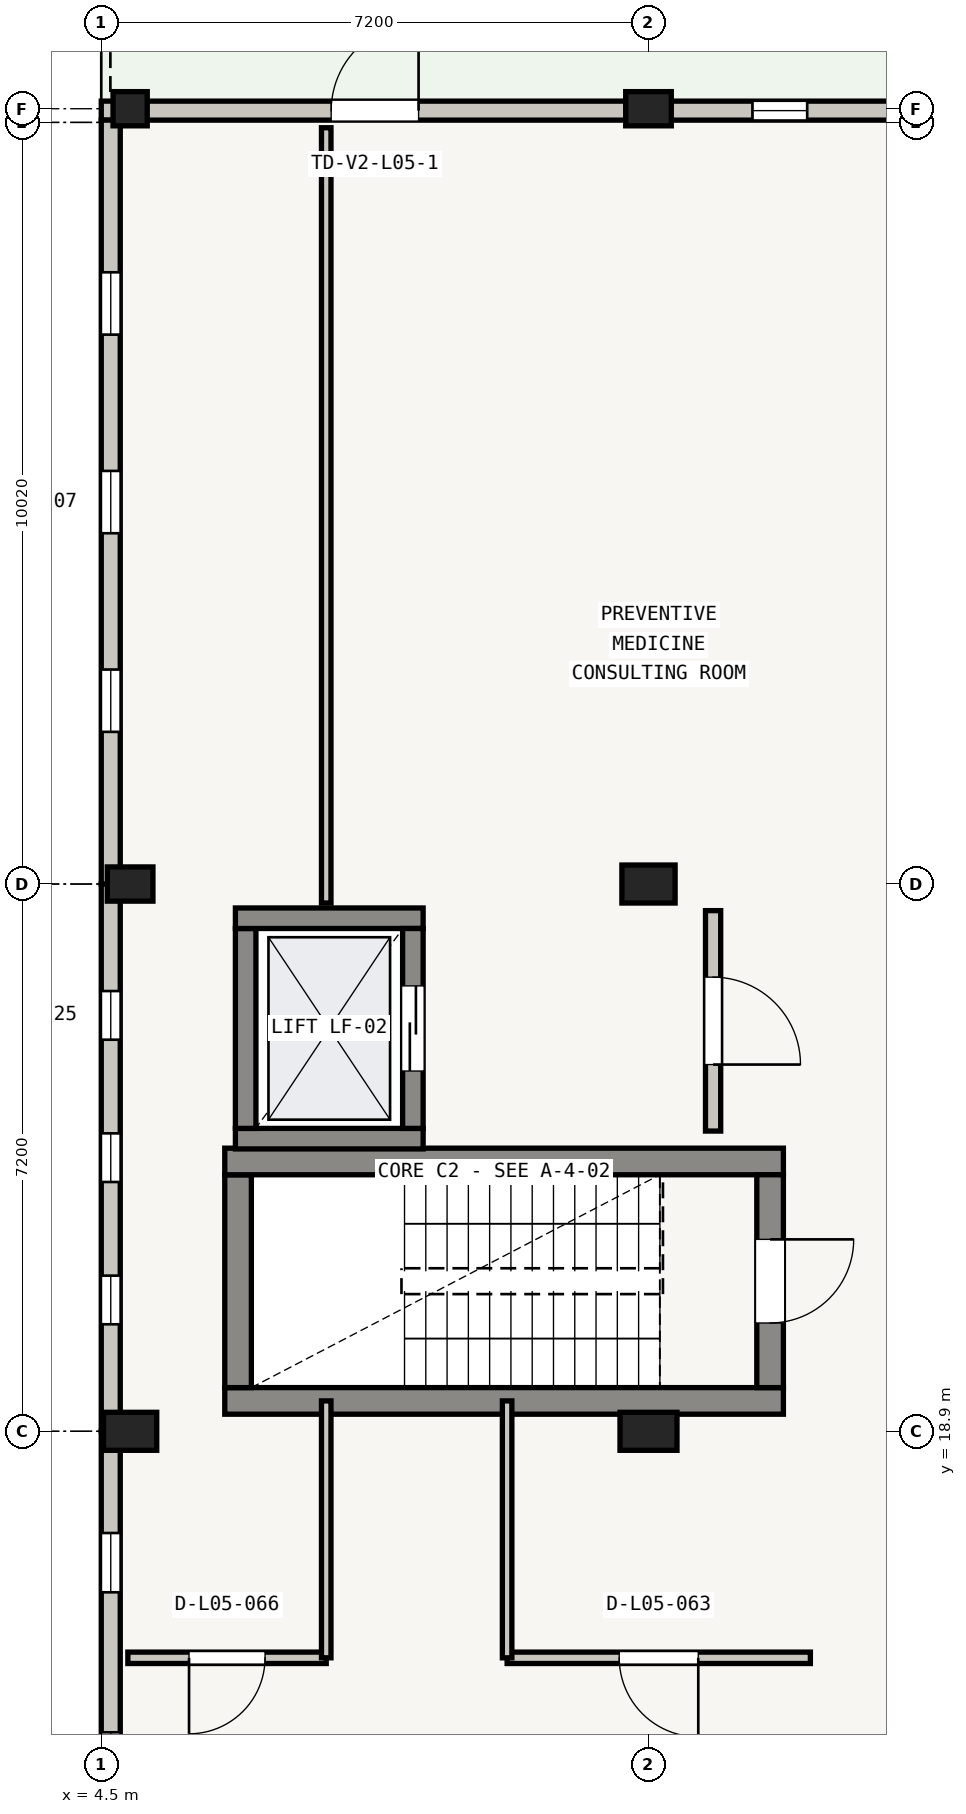
"""IFC4 building model, lengths in metres.
Left out: names, types, materials, properties, quantities, classifications, styles, units other than length and angle.
Written with IfcOpenShell. Run it as: python <this file> out.ifc"""

import sys

from ifc_helpers import new_model, si_unit, direction, frame, frame_2d, origin, origin_2d, place, context, subcontext, project, spatial, rectangle, extrude, element, fill, save


model = new_model("IFC4")
c1 = context("Model", 3, precision=1e-05, world=origin(), true_north=direction((0.0, 1.0)))
c2 = subcontext(c1, "Body", "Model", "MODEL_VIEW")
j1 = project(units=[si_unit("LENGTHUNIT", "METRE"), si_unit("PLANEANGLEUNIT", "RADIAN")], contexts=[c1])
p1 = place(None, origin())
s1 = spatial("IfcSite", under=j1, at=p1, CompositionType="ELEMENT")
p2 = place(p1, origin())
s2 = spatial("IfcBuilding", under=s1, at=p2, CompositionType="ELEMENT")
p3 = place(p2, frame((0.0, 0.0, 21.15)))
s3 = spatial("IfcBuildingStorey", under=s2, at=p3, CompositionType="ELEMENT", Elevation=21.15)
p4 = place(p3, frame((4.88, 18.9, 0.0), z_axis=(0.0, 0.0, 1.0), x_axis=(1.0, 0.0, 0.0)))
e1 = element("IfcColumn", 1, at=p4, inside=s3, PredefinedType="COLUMN", context=c2, shape_type="SweptSolid", body=[
    extrude(rectangle(XDim=0.7, YDim=0.5, at=origin_2d()), origin(), (0.0, 0.0, 1.0), 3.62),
])
p5 = place(p3, frame((4.88, 26.1, 0.0), z_axis=(0.0, 0.0, 1.0), x_axis=(1.0, 0.0, 0.0)))
e2 = element("IfcColumn", 2, at=p5, inside=s3, PredefinedType="COLUMN", context=c2, shape_type="SweptSolid", body=[
    extrude(rectangle(XDim=0.6, YDim=0.45, at=origin_2d()), origin(), (0.0, 0.0, 1.0), 3.62),
])
p6 = place(p3, frame((4.88, 36.3, 0.0), z_axis=(0.0, 0.0, 1.0), x_axis=(1.0, 0.0, 0.0)))
e3 = element("IfcColumn", 3, at=p6, inside=s3, PredefinedType="COLUMN", context=c2, shape_type="SweptSolid", body=[
    extrude(rectangle(XDim=0.45, YDim=0.45, at=origin_2d()), origin(), (0.0, 0.0, 1.0), 3.62),
])
p7 = place(p3, frame((11.7, 18.9, 0.0), z_axis=(0.0, 0.0, 1.0), x_axis=(1.0, 0.0, 0.0)))
e4 = element("IfcColumn", 4, at=p7, inside=s3, PredefinedType="COLUMN", context=c2, shape_type="SweptSolid", body=[
    extrude(rectangle(XDim=0.75, YDim=0.5, at=origin_2d()), origin(), (0.0, 0.0, 1.0), 3.62),
])
p8 = place(p3, frame((11.7, 26.1, 0.0), z_axis=(0.0, 0.0, 1.0), x_axis=(1.0, 0.0, 0.0)))
e5 = element("IfcColumn", 5, at=p8, inside=s3, PredefinedType="COLUMN", context=c2, shape_type="SweptSolid", body=[
    extrude(rectangle(XDim=0.7, YDim=0.5, at=origin_2d()), origin(), (0.0, 0.0, 1.0), 3.62),
])
p9 = place(p3, frame((11.7, 36.3, 0.0), z_axis=(0.0, 0.0, 1.0), x_axis=(1.0, 0.0, 0.0)))
e6 = element("IfcColumn", 6, at=p9, inside=s3, PredefinedType="COLUMN", context=c2, shape_type="SweptSolid", body=[
    extrude(rectangle(XDim=0.6, YDim=0.45, at=origin_2d()), origin(), (0.0, 0.0, 1.0), 3.62),
])
p10 = place(p3, frame((4.5, 36.275, 0.0), z_axis=(0.0, 0.0, 1.0), x_axis=(1.0, 0.0, 0.0)))
e7 = element("IfcWall", 7, at=p10, inside=s3, PredefinedType="STANDARD", context=c2, shape_type="SweptSolid", body=[
    extrude(rectangle(XDim=7.2, YDim=0.25, at=frame_2d((3.6, 0.0))), origin(), (0.0, 0.0, 1.0), 3.105),
])
p11 = place(p10, frame((3.025, 0.0, 0.19)))
e8 = element("IfcOpeningElement", 8, at=p11, cuts=e7, PredefinedType="OPENING", context=c2, shape_type="SweptSolid", body=[
    extrude(rectangle(XDim=1.15, YDim=2.02, at=frame_2d((0.575, 1.01))), frame((0.0, 0.125, 0.0), z_axis=(0.0, -1.0, 0.0), x_axis=(1.0, 0.0, 0.0)), (0.0, 0.0, 1.0), 0.25),
])
p12 = place(p3, frame((11.7, 36.275, 0.0), z_axis=(0.0, 0.0, 1.0), x_axis=(1.0, 0.0, 0.0)))
e9 = element("IfcWall", 9, at=p12, inside=s3, PredefinedType="STANDARD", context=c2, shape_type="SweptSolid", body=[
    extrude(rectangle(XDim=7.2, YDim=0.25, at=frame_2d((3.6, 0.0))), origin(), (0.0, 0.0, 1.0), 2.885),
])
p13 = place(p12, frame((1.368, 0.0, 0.6)))
e10 = element("IfcOpeningElement", 10, at=p13, cuts=e9, PredefinedType="OPENING", context=c2, shape_type="SweptSolid", body=[
    extrude(rectangle(XDim=0.72, YDim=1.85, at=frame_2d((0.36, 0.925))), frame((0.0, 0.125, 0.0), z_axis=(0.0, -1.0, 0.0), x_axis=(1.0, 0.0, 0.0)), (0.0, 0.0, 1.0), 0.25),
])
p14 = place(p12, frame((3.24, 0.0, 0.6)))
e11 = element("IfcOpeningElement", 11, at=p14, cuts=e9, PredefinedType="OPENING", context=c2, shape_type="SweptSolid", body=[
    extrude(rectangle(XDim=0.72, YDim=1.85, at=frame_2d((0.36, 0.925))), frame((0.0, 0.125, 0.0), z_axis=(0.0, -1.0, 0.0), x_axis=(1.0, 0.0, 0.0)), (0.0, 0.0, 1.0), 0.25),
])
p15 = place(p3, frame((4.625, 11.7, 0.0), z_axis=(0.0, 0.0, 1.0), x_axis=(0.0, 1.0, 0.0)))
e12 = element("IfcWall", 12, at=p15, inside=s3, PredefinedType="STANDARD", context=c2, shape_type="SweptSolid", body=[
    extrude(rectangle(XDim=7.2, YDim=0.25, at=frame_2d((3.6, 0.0))), origin(), (0.0, 0.0, 1.0), 3.005),
])
p16 = place(p15, frame((1.338, 0.0, 0.6)))
e13 = element("IfcOpeningElement", 13, at=p16, cuts=e12, PredefinedType="OPENING", context=c2, shape_type="SweptSolid", body=[
    extrude(rectangle(XDim=0.78, YDim=1.95, at=frame_2d((0.39, 0.975))), frame((0.0, 0.125, 0.0), z_axis=(0.0, -1.0, 0.0), x_axis=(1.0, 0.0, 0.0)), (0.0, 0.0, 1.0), 0.25),
])
p17 = place(p15, frame((2.46, 0.0, 0.6)))
e14 = element("IfcOpeningElement", 14, at=p17, cuts=e12, PredefinedType="OPENING", context=c2, shape_type="SweptSolid", body=[
    extrude(rectangle(XDim=0.78, YDim=1.95, at=frame_2d((0.39, 0.975))), frame((0.0, 0.125, 0.0), z_axis=(0.0, -1.0, 0.0), x_axis=(1.0, 0.0, 0.0)), (0.0, 0.0, 1.0), 0.25),
])
p18 = place(p15, frame((5.082, 0.0, 0.6)))
e15 = element("IfcOpeningElement", 15, at=p18, cuts=e12, PredefinedType="OPENING", context=c2, shape_type="SweptSolid", body=[
    extrude(rectangle(XDim=0.78, YDim=1.95, at=frame_2d((0.39, 0.975))), frame((0.0, 0.125, 0.0), z_axis=(0.0, -1.0, 0.0), x_axis=(1.0, 0.0, 0.0)), (0.0, 0.0, 1.0), 0.25),
])
p19 = place(p3, frame((4.625, 18.9, 0.0), z_axis=(0.0, 0.0, 1.0), x_axis=(0.0, 1.0, 0.0)))
e16 = element("IfcWall", 16, at=p19, inside=s3, PredefinedType="STANDARD", context=c2, shape_type="SweptSolid", body=[
    extrude(rectangle(XDim=7.2, YDim=0.25, at=frame_2d((3.6, 0.0))), origin(), (0.0, 0.0, 1.0), 3.025),
])
p20 = place(p19, frame((1.408, 0.0, 0.6)))
e17 = element("IfcOpeningElement", 17, at=p20, cuts=e16, PredefinedType="OPENING", context=c2, shape_type="SweptSolid", body=[
    extrude(rectangle(XDim=0.64, YDim=1.85, at=frame_2d((0.32, 0.925))), frame((0.0, 0.125, 0.0), z_axis=(0.0, -1.0, 0.0), x_axis=(1.0, 0.0, 0.0)), (0.0, 0.0, 1.0), 0.25),
])
p21 = place(p19, frame((3.28, 0.0, 0.6)))
e18 = element("IfcOpeningElement", 18, at=p21, cuts=e16, PredefinedType="OPENING", context=c2, shape_type="SweptSolid", body=[
    extrude(rectangle(XDim=0.64, YDim=1.85, at=frame_2d((0.32, 0.925))), frame((0.0, 0.125, 0.0), z_axis=(0.0, -1.0, 0.0), x_axis=(1.0, 0.0, 0.0)), (0.0, 0.0, 1.0), 0.25),
])
p22 = place(p19, frame((5.152, 0.0, 0.6)))
e19 = element("IfcOpeningElement", 19, at=p22, cuts=e16, PredefinedType="OPENING", context=c2, shape_type="SweptSolid", body=[
    extrude(rectangle(XDim=0.64, YDim=1.85, at=frame_2d((0.32, 0.925))), frame((0.0, 0.125, 0.0), z_axis=(0.0, -1.0, 0.0), x_axis=(1.0, 0.0, 0.0)), (0.0, 0.0, 1.0), 0.25),
])
p23 = place(p3, frame((4.625, 26.1, 0.0), z_axis=(0.0, 0.0, 1.0), x_axis=(0.0, 1.0, 0.0)))
e20 = element("IfcWall", 20, at=p23, inside=s3, PredefinedType="STANDARD", context=c2, shape_type="SweptSolid", body=[
    extrude(rectangle(XDim=10.05, YDim=0.25, at=frame_2d((5.025, 0.0))), origin(), (0.0, 0.0, 1.0), 3.055),
])
p24 = place(p23, frame((2.002, 0.0, 0.55)))
e21 = element("IfcOpeningElement", 21, at=p24, cuts=e20, PredefinedType="OPENING", context=c2, shape_type="SweptSolid", body=[
    extrude(rectangle(XDim=0.82, YDim=2.2, at=frame_2d((0.41, 1.1))), frame((0.0, 0.125, 0.0), z_axis=(0.0, -1.0, 0.0), x_axis=(1.0, 0.0, 0.0)), (0.0, 0.0, 1.0), 0.25),
])
p25 = place(p23, frame((4.615, 0.0, 0.55)))
e22 = element("IfcOpeningElement", 22, at=p25, cuts=e20, PredefinedType="OPENING", context=c2, shape_type="SweptSolid", body=[
    extrude(rectangle(XDim=0.82, YDim=2.2, at=frame_2d((0.41, 1.1))), frame((0.0, 0.125, 0.0), z_axis=(0.0, -1.0, 0.0), x_axis=(1.0, 0.0, 0.0)), (0.0, 0.0, 1.0), 0.25),
])
p26 = place(p23, frame((7.228, 0.0, 0.55)))
e23 = element("IfcOpeningElement", 23, at=p26, cuts=e20, PredefinedType="OPENING", context=c2, shape_type="SweptSolid", body=[
    extrude(rectangle(XDim=0.82, YDim=2.2, at=frame_2d((0.41, 1.1))), frame((0.0, 0.125, 0.0), z_axis=(0.0, -1.0, 0.0), x_axis=(1.0, 0.0, 0.0)), (0.0, 0.0, 1.0), 0.25),
])
p27 = place(p3, frame((13.475, 19.3, 0.0), z_axis=(0.0, 0.0, 1.0), x_axis=(-1.0, 0.0, 0.0)))
e24 = element("IfcWall", 24, at=p27, inside=s3, PredefinedType="SHEAR", context=c2, shape_type="SweptSolid", body=[
    extrude(rectangle(XDim=7.35, YDim=0.35, at=frame_2d((3.675, 0.0))), origin(), (0.0, 0.0, 1.0), 3.62),
])
p28 = place(p3, frame((6.3, 19.475, 0.0), z_axis=(0.0, 0.0, 1.0), x_axis=(0.0, 1.0, 0.0)))
e25 = element("IfcWall", 25, at=p28, inside=s3, PredefinedType="SHEAR", context=c2, shape_type="SweptSolid", body=[
    extrude(rectangle(XDim=2.8, YDim=0.35, at=frame_2d((1.4, 0.0))), origin(), (0.0, 0.0, 1.0), 3.62),
])
p29 = place(p3, frame((6.125, 22.45, 0.0), z_axis=(0.0, 0.0, 1.0), x_axis=(1.0, 0.0, 0.0)))
e26 = element("IfcWall", 26, at=p29, inside=s3, PredefinedType="SHEAR", context=c2, shape_type="SweptSolid", body=[
    extrude(rectangle(XDim=7.35, YDim=0.35, at=frame_2d((3.675, 0.0))), origin(), (0.0, 0.0, 1.0), 3.62),
])
p30 = place(p3, frame((13.3, 22.275, 0.0), z_axis=(0.0, 0.0, 1.0), x_axis=(0.0, -1.0, 0.0)))
e27 = element("IfcWall", 27, at=p30, inside=s3, PredefinedType="SHEAR", context=c2, shape_type="SweptSolid", body=[
    extrude(rectangle(XDim=2.8, YDim=0.35, at=frame_2d((1.4, 0.0))), origin(), (0.0, 0.0, 1.0), 3.62),
])
p31 = place(p30, frame((0.85, 0.0, 0.0)))
e28 = element("IfcOpeningElement", 28, at=p31, cuts=e27, PredefinedType="OPENING", context=c2, shape_type="SweptSolid", body=[
    extrude(rectangle(XDim=1.1, YDim=2.05, at=frame_2d((0.55, 1.025))), frame((0.0, 0.175, 0.0), z_axis=(0.0, -1.0, 0.0), x_axis=(1.0, 0.0, 0.0)), (0.0, 0.0, 1.0), 0.35),
])
p32 = place(p3, frame((8.735, 22.75, 0.0), z_axis=(0.0, 0.0, 1.0), x_axis=(-1.0, 0.0, 0.0)))
e29 = element("IfcWall", 29, at=p32, inside=s3, PredefinedType="SHEAR", context=c2, shape_type="SweptSolid", body=[
    extrude(rectangle(XDim=2.47, YDim=0.27, at=frame_2d((1.235, 0.0))), origin(), (0.0, 0.0, 1.0), 3.62),
])
p33 = place(p3, frame((6.4, 22.885, 0.0), z_axis=(0.0, 0.0, 1.0), x_axis=(0.0, 1.0, 0.0)))
e30 = element("IfcWall", 30, at=p33, inside=s3, PredefinedType="SHEAR", context=c2, shape_type="SweptSolid", body=[
    extrude(rectangle(XDim=2.63, YDim=0.27, at=frame_2d((1.315, 0.0))), origin(), (0.0, 0.0, 1.0), 3.62),
])
p34 = place(p3, frame((6.265, 25.65, 0.0), z_axis=(0.0, 0.0, 1.0), x_axis=(1.0, 0.0, 0.0)))
e31 = element("IfcWall", 31, at=p34, inside=s3, PredefinedType="SHEAR", context=c2, shape_type="SweptSolid", body=[
    extrude(rectangle(XDim=2.47, YDim=0.27, at=frame_2d((1.235, 0.0))), origin(), (0.0, 0.0, 1.0), 3.62),
])
p35 = place(p3, frame((8.6, 25.515, 0.0), z_axis=(0.0, 0.0, 1.0), x_axis=(0.0, -1.0, 0.0)))
e32 = element("IfcWall", 32, at=p35, inside=s3, PredefinedType="SHEAR", context=c2, shape_type="SweptSolid", body=[
    extrude(rectangle(XDim=2.63, YDim=0.27, at=frame_2d((1.315, 0.0))), origin(), (0.0, 0.0, 1.0), 3.62),
])
p36 = place(p35, frame((0.755, 0.0, 0.0)))
e33 = element("IfcOpeningElement", 33, at=p36, cuts=e32, PredefinedType="OPENING", context=c2, shape_type="SweptSolid", body=[
    extrude(rectangle(XDim=1.12, YDim=2.1, at=frame_2d((0.56, 1.05))), frame((0.0, 0.135, 0.0), z_axis=(0.0, -1.0, 0.0), x_axis=(1.0, 0.0, 0.0)), (0.0, 0.0, 1.0), 0.27),
])
p37 = place(p3, frame((12.55, 25.75, 0.0), z_axis=(0.0, 0.0, 1.0), x_axis=(0.0, -1.0, 0.0)))
e34 = element("IfcWall", 34, at=p37, inside=s3, PredefinedType="SOLIDWALL", context=c2, shape_type="SweptSolid", body=[
    extrude(rectangle(XDim=2.9, YDim=0.2, at=frame_2d((1.45, 0.0))), origin(), (0.0, 0.0, 1.0), 2.64),
])
p38 = place(p37, frame((0.875, 0.0, 0.0)))
e35 = element("IfcOpeningElement", 35, at=p38, cuts=e34, PredefinedType="OPENING", context=c2, shape_type="SweptSolid", body=[
    extrude(rectangle(XDim=1.15, YDim=2.05, at=frame_2d((0.575, 1.025))), frame((0.0, 0.1, 0.0), z_axis=(0.0, -1.0, 0.0), x_axis=(1.0, 0.0, 0.0)), (0.0, 0.0, 1.0), 0.2),
])
p39 = place(p3, frame((13.83, 15.92, 0.0), z_axis=(0.0, 0.0, 1.0), x_axis=(-1.0, 0.0, 0.0)))
e36 = element("IfcWall", 36, at=p39, inside=s3, PredefinedType="PARTITIONING", context=c2, shape_type="SweptSolid", body=[
    extrude(rectangle(XDim=3.99, YDim=0.15, at=frame_2d((1.995, 0.0))), origin(), (0.0, 0.0, 1.0), 2.64),
])
p40 = place(p39, frame((1.475, 0.0, 0.0)))
e37 = element("IfcOpeningElement", 37, at=p40, cuts=e36, PredefinedType="OPENING", context=c2, shape_type="SweptSolid", body=[
    extrude(rectangle(XDim=1.04, YDim=2.05, at=frame_2d((0.52, 1.025))), frame((0.0, 0.075, 0.0), z_axis=(0.0, -1.0, 0.0), x_axis=(1.0, 0.0, 0.0)), (0.0, 0.0, 1.0), 0.15),
])
p41 = place(p3, frame((9.84, 15.92, 0.0), z_axis=(0.0, 0.0, 1.0), x_axis=(0.0, 1.0, 0.0)))
e38 = element("IfcWall", 38, at=p41, inside=s3, PredefinedType="PARTITIONING", context=c2, shape_type="SweptSolid", body=[
    extrude(rectangle(XDim=3.38, YDim=0.125, at=frame_2d((1.69, 0.0))), origin(), (0.0, 0.0, 1.0), 2.64),
])
p42 = place(p3, frame((7.46, 15.92, 0.0), z_axis=(0.0, 0.0, 1.0), x_axis=(-1.0, 0.0, 0.0)))
e39 = element("IfcWall", 39, at=p42, inside=s3, PredefinedType="PARTITIONING", context=c2, shape_type="SweptSolid", body=[
    extrude(rectangle(XDim=2.61, YDim=0.15, at=frame_2d((1.305, 0.0))), origin(), (0.0, 0.0, 1.0), 2.64),
])
p43 = place(p42, frame((0.805, 0.0, 0.0)))
e40 = element("IfcOpeningElement", 40, at=p43, cuts=e39, PredefinedType="OPENING", context=c2, shape_type="SweptSolid", body=[
    extrude(rectangle(XDim=1.0, YDim=2.05, at=frame_2d((0.5, 1.025))), frame((0.0, 0.075, 0.0), z_axis=(0.0, -1.0, 0.0), x_axis=(1.0, 0.0, 0.0)), (0.0, 0.0, 1.0), 0.15),
])
p44 = place(p3, frame((7.46, 36.05, 0.0), z_axis=(0.0, 0.0, 1.0), x_axis=(0.0, -1.0, 0.0)))
e41 = element("IfcWall", 41, at=p44, inside=s3, PredefinedType="PARTITIONING", context=c2, shape_type="SweptSolid", body=[
    extrude(rectangle(XDim=10.2, YDim=0.125, at=frame_2d((5.1, 0.0))), origin(), (0.0, 0.0, 1.0), 2.64),
])
p45 = place(p3, frame((7.46, 19.3, 0.0), z_axis=(0.0, 0.0, 1.0), x_axis=(0.0, -1.0, 0.0)))
e42 = element("IfcWall", 42, at=p45, inside=s3, PredefinedType="PARTITIONING", context=c2, shape_type="SweptSolid", body=[
    extrude(rectangle(XDim=3.38, YDim=0.125, at=frame_2d((1.69, 0.0))), origin(), (0.0, 0.0, 1.0), 2.64),
])
p46 = place(p11, origin())
e43 = element("IfcDoor", 43, at=p46, inside=s3, OperationType="SINGLE_SWING_RIGHT", PredefinedType="DOOR", context=c2, shape_type="SweptSolid", body=[
    extrude(rectangle(XDim=1.15, YDim=2.02, at=frame_2d((0.575, 1.01))), frame((0.0, 0.025, 0.0), z_axis=(0.0, -1.0, 0.0), x_axis=(1.0, 0.0, 0.0)), (0.0, 0.0, 1.0), 0.05),
])
fill(e8, e43)
p47 = place(p13, origin())
e44 = element("IfcWindow", 44, at=p47, inside=s3, PartitioningType="SINGLE_PANEL", PredefinedType="WINDOW", context=c2, shape_type="SweptSolid", body=[
    extrude(rectangle(XDim=0.72, YDim=1.85, at=frame_2d((0.36, 0.925))), frame((0.0, 0.03, 0.0), z_axis=(0.0, -1.0, 0.0), x_axis=(1.0, 0.0, 0.0)), (0.0, 0.0, 1.0), 0.06),
])
fill(e10, e44)
p48 = place(p17, origin())
e45 = element("IfcWindow", 45, at=p48, inside=s3, PartitioningType="SINGLE_PANEL", PredefinedType="WINDOW", context=c2, shape_type="SweptSolid", body=[
    extrude(rectangle(XDim=0.78, YDim=1.95, at=frame_2d((0.39, 0.975))), frame((0.0, 0.03, 0.0), z_axis=(0.0, -1.0, 0.0), x_axis=(1.0, 0.0, 0.0)), (0.0, 0.0, 1.0), 0.06),
])
fill(e14, e45)
p49 = place(p18, origin())
e46 = element("IfcWindow", 46, at=p49, inside=s3, PartitioningType="SINGLE_PANEL", PredefinedType="WINDOW", context=c2, shape_type="SweptSolid", body=[
    extrude(rectangle(XDim=0.78, YDim=1.95, at=frame_2d((0.39, 0.975))), frame((0.0, 0.03, 0.0), z_axis=(0.0, -1.0, 0.0), x_axis=(1.0, 0.0, 0.0)), (0.0, 0.0, 1.0), 0.06),
])
fill(e15, e46)
p50 = place(p20, origin())
e47 = element("IfcWindow", 47, at=p50, inside=s3, PartitioningType="SINGLE_PANEL", PredefinedType="WINDOW", context=c2, shape_type="SweptSolid", body=[
    extrude(rectangle(XDim=0.64, YDim=1.85, at=frame_2d((0.32, 0.925))), frame((0.0, 0.03, 0.0), z_axis=(0.0, -1.0, 0.0), x_axis=(1.0, 0.0, 0.0)), (0.0, 0.0, 1.0), 0.06),
])
fill(e17, e47)
p51 = place(p21, origin())
e48 = element("IfcWindow", 48, at=p51, inside=s3, PartitioningType="SINGLE_PANEL", PredefinedType="WINDOW", context=c2, shape_type="SweptSolid", body=[
    extrude(rectangle(XDim=0.64, YDim=1.85, at=frame_2d((0.32, 0.925))), frame((0.0, 0.03, 0.0), z_axis=(0.0, -1.0, 0.0), x_axis=(1.0, 0.0, 0.0)), (0.0, 0.0, 1.0), 0.06),
])
fill(e18, e48)
p52 = place(p22, origin())
e49 = element("IfcWindow", 49, at=p52, inside=s3, PartitioningType="SINGLE_PANEL", PredefinedType="WINDOW", context=c2, shape_type="SweptSolid", body=[
    extrude(rectangle(XDim=0.64, YDim=1.85, at=frame_2d((0.32, 0.925))), frame((0.0, 0.03, 0.0), z_axis=(0.0, -1.0, 0.0), x_axis=(1.0, 0.0, 0.0)), (0.0, 0.0, 1.0), 0.06),
])
fill(e19, e49)
p53 = place(p24, origin())
e50 = element("IfcWindow", 50, at=p53, inside=s3, PartitioningType="SINGLE_PANEL", PredefinedType="WINDOW", context=c2, shape_type="SweptSolid", body=[
    extrude(rectangle(XDim=0.82, YDim=2.2, at=frame_2d((0.41, 1.1))), frame((0.0, 0.03, 0.0), z_axis=(0.0, -1.0, 0.0), x_axis=(1.0, 0.0, 0.0)), (0.0, 0.0, 1.0), 0.06),
])
fill(e21, e50)
p54 = place(p25, origin())
e51 = element("IfcWindow", 51, at=p54, inside=s3, PartitioningType="SINGLE_PANEL", PredefinedType="WINDOW", context=c2, shape_type="SweptSolid", body=[
    extrude(rectangle(XDim=0.82, YDim=2.2, at=frame_2d((0.41, 1.1))), frame((0.0, 0.03, 0.0), z_axis=(0.0, -1.0, 0.0), x_axis=(1.0, 0.0, 0.0)), (0.0, 0.0, 1.0), 0.06),
])
fill(e22, e51)
p55 = place(p26, origin())
e52 = element("IfcWindow", 52, at=p55, inside=s3, PartitioningType="SINGLE_PANEL", PredefinedType="WINDOW", context=c2, shape_type="SweptSolid", body=[
    extrude(rectangle(XDim=0.82, YDim=2.2, at=frame_2d((0.41, 1.1))), frame((0.0, 0.03, 0.0), z_axis=(0.0, -1.0, 0.0), x_axis=(1.0, 0.0, 0.0)), (0.0, 0.0, 1.0), 0.06),
])
fill(e23, e52)
p56 = place(p31, origin())
e53 = element("IfcDoor", 53, at=p56, inside=s3, OperationType="SINGLE_SWING_LEFT", PredefinedType="DOOR", context=c2, shape_type="SweptSolid", body=[
    extrude(rectangle(XDim=1.1, YDim=2.05, at=frame_2d((0.55, 1.025))), frame((0.0, 0.025, 0.0), z_axis=(0.0, -1.0, 0.0), x_axis=(1.0, 0.0, 0.0)), (0.0, 0.0, 1.0), 0.05),
])
fill(e28, e53)
p57 = place(p36, origin())
e54 = element("IfcDoor", 54, at=p57, inside=s3, OperationType="DOUBLE_DOOR_SLIDING", PredefinedType="DOOR", context=c2, shape_type="SweptSolid", body=[
    extrude(rectangle(XDim=1.12, YDim=2.1, at=frame_2d((0.56, 1.05))), frame((0.0, 0.025, 0.0), z_axis=(0.0, -1.0, 0.0), x_axis=(1.0, 0.0, 0.0)), (0.0, 0.0, 1.0), 0.05),
])
fill(e33, e54)
p58 = place(p38, origin())
e55 = element("IfcDoor", 55, at=p58, inside=s3, OperationType="SINGLE_SWING_RIGHT", PredefinedType="DOOR", context=c2, shape_type="SweptSolid", body=[
    extrude(rectangle(XDim=1.15, YDim=2.05, at=frame_2d((0.575, 1.025))), frame((0.0, 0.025, 0.0), z_axis=(0.0, -1.0, 0.0), x_axis=(1.0, 0.0, 0.0)), (0.0, 0.0, 1.0), 0.05),
])
fill(e35, e55)
p59 = place(p40, origin())
e56 = element("IfcDoor", 56, at=p59, inside=s3, OperationType="SINGLE_SWING_LEFT", PredefinedType="DOOR", context=c2, shape_type="SweptSolid", body=[
    extrude(rectangle(XDim=1.04, YDim=2.05, at=frame_2d((0.52, 1.025))), frame((0.0, 0.025, 0.0), z_axis=(0.0, -1.0, 0.0), x_axis=(1.0, 0.0, 0.0)), (0.0, 0.0, 1.0), 0.05),
])
fill(e37, e56)
p60 = place(p43, origin())
e57 = element("IfcDoor", 57, at=p60, inside=s3, OperationType="SINGLE_SWING_RIGHT", PredefinedType="DOOR", context=c2, shape_type="SweptSolid", body=[
    extrude(rectangle(XDim=1.0, YDim=2.05, at=frame_2d((0.5, 1.025))), frame((0.0, 0.025, 0.0), z_axis=(0.0, -1.0, 0.0), x_axis=(1.0, 0.0, 0.0)), (0.0, 0.0, 1.0), 0.05),
])
fill(e40, e57)
save(model, sys.argv[1])
